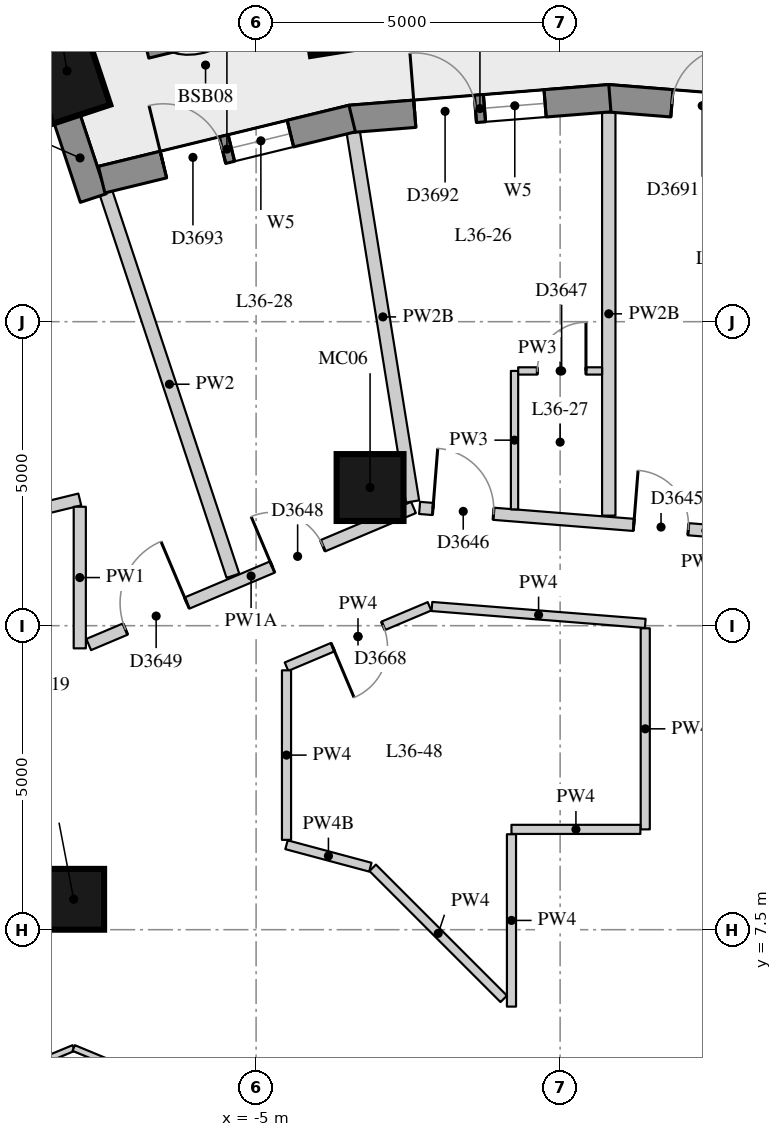
"""IFC4 building model, lengths in metres.
Left out: names, types, materials, properties, quantities, classifications, styles, units other than length and angle.
Written with IfcOpenShell. Run it as: python <this file> out.ifc"""

import sys

from ifc_helpers import new_model, si_unit, direction, frame, frame_2d, origin, origin_2d, place, context, subcontext, project, spatial, rectangle, extrude, element, fill, save


model = new_model("IFC4")
c1 = context("Model", 3, precision=1e-05, world=origin(), true_north=direction((0.0, 1.0)))
c2 = subcontext(c1, "Body", "Model", "MODEL_VIEW")
j1 = project(units=[si_unit("LENGTHUNIT", "METRE"), si_unit("PLANEANGLEUNIT", "RADIAN")], contexts=[c1])
p1 = place(None, origin())
s1 = spatial("IfcSite", under=j1, at=p1, CompositionType="ELEMENT")
p2 = place(p1, origin())
s2 = spatial("IfcBuilding", under=s1, at=p2, CompositionType="ELEMENT")
p3 = place(p2, frame((0.0, 0.0, 128.5)))
s3 = spatial("IfcBuildingStorey", under=s2, at=p3, CompositionType="ELEMENT", Elevation=128.5)
for number, where, z_axis, x_axis in (
    (1, (-3.724, 22.691, 0.0), (0.0, 0.0, 1.0), (-0.159, 0.987, 0.0)),
    (2, (-8.11, 21.624, 0.0), (0.0, 0.0, 1.0), (-0.315, 0.949, 0.0)),
):
    element("IfcColumn", number, at=place(p3, frame(where, z_axis=z_axis, x_axis=x_axis)), inside=s3, PredefinedType="COLUMN", context=c2, shape_type="SweptSolid", body=[
        extrude(rectangle(XDim=1.5, YDim=1.0, at=origin_2d()), origin(), (0.0, 0.0, 1.0), 3.3),
    ])
p4 = place(p3, frame((-8.0, 8.0, 0.0), z_axis=(0.0, 0.0, 1.0), x_axis=(1.0, 0.0, 0.0)))
e3 = element("IfcColumn", 3, at=p4, inside=s3, PredefinedType="COLUMN", context=c2, shape_type="SweptSolid", body=[
    extrude(rectangle(XDim=1.0, YDim=1.0, at=origin_2d()), origin(), (0.0, 0.0, 1.0), 3.3),
])
p5 = place(p3, frame((-3.126, 14.772, 0.0), z_axis=(0.0, 0.0, 1.0), x_axis=(1.0, 0.0, 0.0)))
e4 = element("IfcColumn", 4, at=p5, inside=s3, PredefinedType="COLUMN", context=c2, shape_type="SweptSolid", body=[
    extrude(rectangle(XDim=1.1, YDim=1.1, at=origin_2d()), origin(), (0.0, 0.0, 1.0), 3.3),
])
p6 = place(p3, frame((-8.114, 20.853, 0.0), z_axis=(0.0, 0.0, 1.0), x_axis=(0.314488854508, -0.949261165534, 0.0)))
e5 = element("IfcWall", 5, at=p6, inside=s3, PredefinedType="SOLIDWALL", context=c2, shape_type="SweptSolid", body=[
    extrude(rectangle(XDim=1.39, YDim=0.45, at=frame_2d((0.695, 0.0))), origin(), (0.0, 0.0, 1.0), 3.02),
])
p7 = place(p3, frame((5.038, 20.837, 0.0), z_axis=(0.0, 0.0, 1.0), x_axis=(-0.996839780714, 0.079438350855, 0.0)))
e6 = element("IfcWall", 6, at=p7, inside=s3, PredefinedType="SOLIDWALL", context=c2, shape_type="SweptSolid", body=[
    extrude(rectangle(XDim=4.269, YDim=0.45, at=frame_2d((2.134, 0.0))), origin(), (0.0, 0.0, 1.0), 3.02),
])
p8 = place(p7, frame((1.06, 0.0, 0.4)))
e7 = element("IfcOpeningElement", 7, at=p8, cuts=e6, PredefinedType="OPENING", context=c2, shape_type="SweptSolid", body=[
    extrude(rectangle(XDim=1.0, YDim=1.75, at=frame_2d((0.5, 0.875))), frame((0.0, 0.235, 0.0), z_axis=(0.0, -1.0, 0.0), x_axis=(1.0, 0.0, 0.0)), (0.0, 0.0, 1.0), 0.47),
])
p9 = place(p7, frame((2.209, 0.0, 0.0)))
e8 = element("IfcOpeningElement", 8, at=p9, cuts=e6, PredefinedType="OPENING", context=c2, shape_type="SweptSolid", body=[
    extrude(rectangle(XDim=1.0, YDim=2.15, at=frame_2d((0.5, 1.075))), frame((0.0, 0.235, 0.0), z_axis=(0.0, -1.0, 0.0), x_axis=(1.0, 0.0, 0.0)), (0.0, 0.0, 1.0), 0.47),
])
p10 = place(p3, frame((0.818, 21.176, 0.0), z_axis=(0.0, 0.0, 1.0), x_axis=(-0.996843824935, -0.079387585235, 0.0)))
e9 = element("IfcWall", 9, at=p10, inside=s3, PredefinedType="SOLIDWALL", context=c2, shape_type="SweptSolid", body=[
    extrude(rectangle(XDim=4.287, YDim=0.45, at=frame_2d((2.144, 0.0))), origin(), (0.0, 0.0, 1.0), 3.02),
])
p11 = place(p10, frame((1.068, 0.0, 0.4)))
e10 = element("IfcOpeningElement", 10, at=p11, cuts=e9, PredefinedType="OPENING", context=c2, shape_type="SweptSolid", body=[
    extrude(rectangle(XDim=1.0, YDim=1.75, at=frame_2d((0.5, 0.875))), frame((0.0, 0.235, 0.0), z_axis=(0.0, -1.0, 0.0), x_axis=(1.0, 0.0, 0.0)), (0.0, 0.0, 1.0), 0.47),
])
p12 = place(p10, frame((2.219, 0.0, 0.0)))
e11 = element("IfcOpeningElement", 11, at=p12, cuts=e9, PredefinedType="OPENING", context=c2, shape_type="SweptSolid", body=[
    extrude(rectangle(XDim=1.0, YDim=2.15, at=frame_2d((0.5, 1.075))), frame((0.0, 0.235, 0.0), z_axis=(0.0, -1.0, 0.0), x_axis=(1.0, 0.0, 0.0)), (0.0, 0.0, 1.0), 0.47),
])
p13 = place(p3, frame((-3.42, 20.841, 0.0), z_axis=(0.0, 0.0, 1.0), x_axis=(-0.971511611373, -0.23699195971, 0.0)))
e12 = element("IfcWall", 12, at=p13, inside=s3, PredefinedType="SOLIDWALL", context=c2, shape_type="SweptSolid", body=[
    extrude(rectangle(XDim=4.241, YDim=0.45, at=frame_2d((2.121, 0.0))), origin(), (0.0, 0.0, 1.0), 3.02),
])
p14 = place(p13, frame((1.045, 0.0, 0.4)))
e13 = element("IfcOpeningElement", 13, at=p14, cuts=e12, PredefinedType="OPENING", context=c2, shape_type="SweptSolid", body=[
    extrude(rectangle(XDim=1.0, YDim=1.75, at=frame_2d((0.5, 0.875))), frame((0.0, 0.235, 0.0), z_axis=(0.0, -1.0, 0.0), x_axis=(1.0, 0.0, 0.0)), (0.0, 0.0, 1.0), 0.47),
])
p15 = place(p13, frame((2.196, 0.0, 0.0)))
e14 = element("IfcOpeningElement", 14, at=p15, cuts=e12, PredefinedType="OPENING", context=c2, shape_type="SweptSolid", body=[
    extrude(rectangle(XDim=1.0, YDim=2.15, at=frame_2d((0.5, 1.075))), frame((0.0, 0.235, 0.0), z_axis=(0.0, -1.0, 0.0), x_axis=(1.0, 0.0, 0.0)), (0.0, 0.0, 1.0), 0.47),
])
p16 = place(p3, frame((-5.099, 22.601, 0.0), z_axis=(0.0, 0.0, 1.0), x_axis=(-0.971654974133, -0.23640349245, 0.0)))
e15 = element("IfcWall", 15, at=p16, inside=s3, PredefinedType="USERDEFINED", context=c2, shape_type="SweptSolid", body=[
    extrude(rectangle(XDim=1.8, YDim=0.7, at=frame_2d((0.9, 0.0))), origin(), (0.0, 0.0, 1.0), 0.75),
])
p17 = place(p3, frame((-9.884, 14.092, 0.0), z_axis=(0.0, 0.0, 1.0), x_axis=(0.971512281799, 0.236989211388, 0.0)))
e16 = element("IfcWall", 16, at=p17, inside=s3, PredefinedType="PARTITIONING", context=c2, shape_type="SweptSolid", body=[
    extrude(rectangle(XDim=2.042, YDim=0.2, at=frame_2d((1.021, 0.0))), origin(), (0.0, 0.0, 1.0), 3.02),
])
p18 = place(p3, frame((-7.9, 14.456, 0.0), z_axis=(0.0, 0.0, 1.0), x_axis=(0.0, -1.0, 0.0)))
e17 = element("IfcWall", 17, at=p18, inside=s3, PredefinedType="PARTITIONING", context=c2, shape_type="SweptSolid", body=[
    extrude(rectangle(XDim=2.328, YDim=0.2, at=frame_2d((1.164, 0.0))), origin(), (0.0, 0.0, 1.0), 3.02),
])
p19 = place(p3, frame((-7.753, 12.19, 0.0), z_axis=(0.0, 0.0, 1.0), x_axis=(0.921319622993, 0.388806059994, 0.0)))
e18 = element("IfcWall", 18, at=p19, inside=s3, PredefinedType="PARTITIONING", context=c2, shape_type="SweptSolid", body=[
    extrude(rectangle(XDim=5.798, YDim=0.2, at=frame_2d((2.899, 0.0))), origin(), (0.0, 0.0, 1.0), 2.57),
])
p20 = place(p19, frame((3.28, 0.0, 0.0)))
e19 = element("IfcOpeningElement", 19, at=p20, cuts=e18, PredefinedType="OPENING", context=c2, shape_type="SweptSolid", body=[
    extrude(rectangle(XDim=0.9, YDim=2.1, at=frame_2d((0.45, 1.05))), frame((0.0, 0.11, 0.0), z_axis=(0.0, -1.0, 0.0), x_axis=(1.0, 0.0, 0.0)), (0.0, 0.0, 1.0), 0.22),
])
p21 = place(p19, frame((0.654, 0.0, 0.0)))
e20 = element("IfcOpeningElement", 20, at=p21, cuts=e18, PredefinedType="OPENING", context=c2, shape_type="SweptSolid", body=[
    extrude(rectangle(XDim=1.1, YDim=2.1, at=frame_2d((0.55, 1.05))), frame((0.0, 0.11, 0.0), z_axis=(0.0, -1.0, 0.0), x_axis=(1.0, 0.0, 0.0)), (0.0, 0.0, 1.0), 0.22),
])
p22 = place(p3, frame((-2.311, 14.437, 0.0), z_axis=(0.0, 0.0, 1.0), x_axis=(0.996870762165, -0.079048615048, 0.0)))
e21 = element("IfcWall", 21, at=p22, inside=s3, PredefinedType="PARTITIONING", context=c2, shape_type="SweptSolid", body=[
    extrude(rectangle(XDim=9.445, YDim=0.2, at=frame_2d((4.722, 0.0))), origin(), (0.0, 0.0, 1.0), 2.42),
])
p23 = place(p22, frame((6.471, 0.0, 0.0)))
e22 = element("IfcOpeningElement", 22, at=p23, cuts=e21, PredefinedType="OPENING", context=c2, shape_type="SweptSolid", body=[
    extrude(rectangle(XDim=1.0, YDim=2.1, at=frame_2d((0.5, 1.05))), frame((0.0, 0.11, 0.0), z_axis=(0.0, -1.0, 0.0), x_axis=(1.0, 0.0, 0.0)), (0.0, 0.0, 1.0), 0.22),
])
p24 = place(p22, frame((3.533, 0.0, 0.0)))
e23 = element("IfcOpeningElement", 23, at=p24, cuts=e21, PredefinedType="OPENING", context=c2, shape_type="SweptSolid", body=[
    extrude(rectangle(XDim=0.9, YDim=2.1, at=frame_2d((0.45, 1.05))), frame((0.0, 0.11, 0.0), z_axis=(0.0, -1.0, 0.0), x_axis=(1.0, 0.0, 0.0)), (0.0, 0.0, 1.0), 0.22),
])
p25 = place(p22, frame((0.22, 0.0, 0.0)))
e24 = element("IfcOpeningElement", 24, at=p25, cuts=e21, PredefinedType="OPENING", context=c2, shape_type="SweptSolid", body=[
    extrude(rectangle(XDim=1.0, YDim=2.1, at=frame_2d((0.5, 1.05))), frame((0.0, 0.11, 0.0), z_axis=(0.0, -1.0, 0.0), x_axis=(1.0, 0.0, 0.0)), (0.0, 0.0, 1.0), 0.22),
])
p26 = place(p3, frame((-4.5, 11.826, 0.0), z_axis=(0.0, 0.0, 1.0), x_axis=(0.921264033472, 0.388937759329, 0.0)))
e25 = element("IfcWall", 25, at=p26, inside=s3, PredefinedType="PARTITIONING", context=c2, shape_type="SweptSolid", body=[
    extrude(rectangle(XDim=2.552, YDim=0.15, at=frame_2d((1.276, 0.0))), origin(), (0.0, 0.0, 1.0), 3.02),
])
p27 = place(p26, frame((0.826, 0.0, 0.0)))
e26 = element("IfcOpeningElement", 26, at=p27, cuts=e25, PredefinedType="OPENING", context=c2, shape_type="SweptSolid", body=[
    extrude(rectangle(XDim=0.9, YDim=2.1, at=frame_2d((0.45, 1.05))), frame((0.0, 0.085, 0.0), z_axis=(0.0, -1.0, 0.0), x_axis=(1.0, 0.0, 0.0)), (0.0, 0.0, 1.0), 0.17),
])
p28 = place(p3, frame((-2.109, 12.816, 0.0), z_axis=(0.0, 0.0, 1.0), x_axis=(0.996868431192, -0.079078005119, 0.0)))
e27 = element("IfcWall", 27, at=p28, inside=s3, PredefinedType="PARTITIONING", context=c2, shape_type="SweptSolid", body=[
    extrude(rectangle(XDim=3.52, YDim=0.15, at=frame_2d((1.76, 0.0))), origin(), (0.0, 0.0, 1.0), 3.02),
])
p29 = place(p3, frame((1.4, 12.457, 0.0), z_axis=(0.0, 0.0, 1.0), x_axis=(0.0, -1.0, 0.0)))
e28 = element("IfcWall", 28, at=p29, inside=s3, PredefinedType="PARTITIONING", context=c2, shape_type="SweptSolid", body=[
    extrude(rectangle(XDim=3.307, YDim=0.15, at=frame_2d((1.654, 0.0))), origin(), (0.0, 0.0, 1.0), 3.02),
])
p30 = place(p3, frame((1.32, 9.15, 0.0), z_axis=(0.0, 0.0, 1.0), x_axis=(-1.0, 0.0, 0.0)))
e29 = element("IfcWall", 29, at=p30, inside=s3, PredefinedType="PARTITIONING", context=c2, shape_type="SweptSolid", body=[
    extrude(rectangle(XDim=2.12, YDim=0.15, at=frame_2d((1.06, 0.0))), origin(), (0.0, 0.0, 1.0), 3.02),
])
p31 = place(p3, frame((-0.8, 9.07, 0.0), z_axis=(0.0, 0.0, 1.0), x_axis=(0.0, -1.0, 0.0)))
e30 = element("IfcWall", 30, at=p31, inside=s3, PredefinedType="PARTITIONING", context=c2, shape_type="SweptSolid", body=[
    extrude(rectangle(XDim=2.835, YDim=0.15, at=frame_2d((1.417, 0.0))), origin(), (0.0, 0.0, 1.0), 3.02),
])
p32 = place(p3, frame((-0.927, 6.363, 0.0), z_axis=(0.0, 0.0, 1.0), x_axis=(-0.707106781187, 0.707106781187, 0.0)))
e31 = element("IfcWall", 31, at=p32, inside=s3, PredefinedType="PARTITIONING", context=c2, shape_type="SweptSolid", body=[
    extrude(rectangle(XDim=3.048, YDim=0.15, at=frame_2d((1.524, 0.0))), origin(), (0.0, 0.0, 1.0), 3.02),
])
p33 = place(p3, frame((-3.121, 8.528, 0.0), z_axis=(0.0, 0.0, 1.0), x_axis=(-0.965941945062, 0.258758881529, 0.0)))
e32 = element("IfcWall", 32, at=p33, inside=s3, PredefinedType="PARTITIONING", context=c2, shape_type="SweptSolid", body=[
    extrude(rectangle(XDim=1.427, YDim=0.15, at=frame_2d((0.714, 0.0))), origin(), (0.0, 0.0, 1.0), 2.47),
])
p34 = place(p3, frame((-4.5, 8.977, 0.0), z_axis=(0.0, 0.0, 1.0), x_axis=(0.0, 1.0, 0.0)))
e33 = element("IfcWall", 33, at=p34, inside=s3, PredefinedType="PARTITIONING", context=c2, shape_type="SweptSolid", body=[
    extrude(rectangle(XDim=2.789, YDim=0.15, at=frame_2d((1.394, 0.0))), origin(), (0.0, 0.0, 1.0), 3.02),
])
p35 = place(p3, frame((0.8, 20.948, 0.0), z_axis=(0.0, 0.0, 1.0), x_axis=(0.0, -1.0, 0.0)))
e34 = element("IfcWall", 34, at=p35, inside=s3, PredefinedType="PARTITIONING", context=c2, shape_type="SweptSolid", body=[
    extrude(rectangle(XDim=6.638, YDim=0.22, at=frame_2d((3.319, 0.0))), origin(), (0.0, 0.0, 1.0), 2.57),
])
p36 = place(p3, frame((-3.402, 20.614, 0.0), z_axis=(0.0, 0.0, 1.0), x_axis=(0.158510822082, -0.987357239951, 0.0)))
e35 = element("IfcWall", 35, at=p36, inside=s3, PredefinedType="PARTITIONING", context=c2, shape_type="SweptSolid", body=[
    extrude(rectangle(XDim=6.148, YDim=0.22, at=frame_2d((3.074, 0.0))), origin(), (0.0, 0.0, 1.0), 2.57),
])
p37 = place(p3, frame((-7.469, 19.622, 0.0), z_axis=(0.0, 0.0, 1.0), x_axis=(0.314539081996, -0.949244523765, 0.0)))
e36 = element("IfcWall", 36, at=p37, inside=s3, PredefinedType="PARTITIONING", context=c2, shape_type="SweptSolid", body=[
    extrude(rectangle(XDim=6.638, YDim=0.22, at=frame_2d((3.319, 0.0))), origin(), (0.0, 0.0, 1.0), 3.02),
])
p38 = place(p3, frame((-0.75, 14.413, 0.0), z_axis=(0.0, 0.0, 1.0), x_axis=(0.0, 1.0, 0.0)))
e37 = element("IfcWall", 37, at=p38, inside=s3, PredefinedType="PARTITIONING", context=c2, shape_type="SweptSolid", body=[
    extrude(rectangle(XDim=2.277, YDim=0.12, at=frame_2d((1.138, 0.0))), origin(), (0.0, 0.0, 1.0), 3.02),
])
p39 = place(p3, frame((-0.69, 16.69, 0.0), z_axis=(0.0, 0.0, 1.0), x_axis=(1.0, 0.0, 0.0)))
e38 = element("IfcWall", 38, at=p39, inside=s3, PredefinedType="PARTITIONING", context=c2, shape_type="SweptSolid", body=[
    extrude(rectangle(XDim=1.38, YDim=0.12, at=frame_2d((0.69, 0.0))), origin(), (0.0, 0.0, 1.0), 3.02),
])
p40 = place(p39, frame((0.315, 0.0, 0.0)))
e39 = element("IfcOpeningElement", 39, at=p40, cuts=e38, PredefinedType="OPENING", context=c2, shape_type="SweptSolid", body=[
    extrude(rectangle(XDim=0.8, YDim=2.1, at=frame_2d((0.4, 1.05))), frame((0.0, 0.07, 0.0), z_axis=(0.0, -1.0, 0.0), x_axis=(1.0, 0.0, 0.0)), (0.0, 0.0, 1.0), 0.14),
])
for number, where, z_axis, x_axis in (
    (40, (-11.927, 3.927, 0.0), (0.0, 0.0, 1.0), (0.924, 0.383, 0.0)),
    (41, (-8.0, 5.554, 0.0), (0.0, 0.0, 1.0), (0.924, -0.383, 0.0)),
):
    element("IfcWall", number, at=place(p3, frame(where, z_axis=z_axis, x_axis=x_axis)), inside=s3, PredefinedType="PARTITIONING", context=c2, shape_type="SweptSolid", body=[
        extrude(rectangle(XDim=4.251, YDim=0.1, at=frame_2d((2.125, 0.0))), origin(), (0.0, 0.0, 1.0), 3.02),
    ])
p41 = place(p9, frame((1.0, 0.0, 0.0), z_axis=(0.0, 0.0, 1.0), x_axis=(-1.0, 0.0, 0.0)))
e42 = element("IfcDoor", 42, at=p41, inside=s3, OperationType="SINGLE_SWING_RIGHT", PredefinedType="DOOR", context=c2, shape_type="SweptSolid", body=[
    extrude(rectangle(XDim=1.0, YDim=2.15, at=frame_2d((0.5, 1.075))), frame((0.0, 0.075, 0.0), z_axis=(0.0, -1.0, 0.0), x_axis=(1.0, 0.0, 0.0)), (0.0, 0.0, 1.0), 0.05),
])
fill(e8, e42)
p42 = place(p11, origin())
e43 = element("IfcWindow", 43, at=p42, inside=s3, PartitioningType="SINGLE_PANEL", PredefinedType="WINDOW", context=c2, shape_type="SweptSolid", body=[
    extrude(rectangle(XDim=1.0, YDim=1.75, at=frame_2d((0.5, 0.875))), frame((0.0, 0.035, 0.0), z_axis=(0.0, -1.0, 0.0), x_axis=(1.0, 0.0, 0.0)), (0.0, 0.0, 1.0), 0.06),
])
fill(e10, e43)
p43 = place(p12, frame((1.0, 0.0, 0.0), z_axis=(0.0, 0.0, 1.0), x_axis=(-1.0, 0.0, 0.0)))
e44 = element("IfcDoor", 44, at=p43, inside=s3, OperationType="SINGLE_SWING_LEFT", PredefinedType="DOOR", context=c2, shape_type="SweptSolid", body=[
    extrude(rectangle(XDim=1.0, YDim=2.15, at=frame_2d((0.5, 1.075))), frame((0.0, 0.075, 0.0), z_axis=(0.0, -1.0, 0.0), x_axis=(1.0, 0.0, 0.0)), (0.0, 0.0, 1.0), 0.05),
])
fill(e11, e44)
p44 = place(p14, origin())
e45 = element("IfcWindow", 45, at=p44, inside=s3, PartitioningType="SINGLE_PANEL", PredefinedType="WINDOW", context=c2, shape_type="SweptSolid", body=[
    extrude(rectangle(XDim=1.0, YDim=1.75, at=frame_2d((0.5, 0.875))), frame((0.0, 0.035, 0.0), z_axis=(0.0, -1.0, 0.0), x_axis=(1.0, 0.0, 0.0)), (0.0, 0.0, 1.0), 0.06),
])
fill(e13, e45)
p45 = place(p15, frame((1.0, 0.0, 0.0), z_axis=(0.0, 0.0, 1.0), x_axis=(-1.0, 0.0, 0.0)))
e46 = element("IfcDoor", 46, at=p45, inside=s3, OperationType="SINGLE_SWING_LEFT", PredefinedType="DOOR", context=c2, shape_type="SweptSolid", body=[
    extrude(rectangle(XDim=1.0, YDim=2.15, at=frame_2d((0.5, 1.075))), frame((0.0, 0.075, 0.0), z_axis=(0.0, -1.0, 0.0), x_axis=(1.0, 0.0, 0.0)), (0.0, 0.0, 1.0), 0.05),
])
fill(e14, e46)
p46 = place(p24, origin())
e47 = element("IfcDoor", 47, at=p46, inside=s3, OperationType="SINGLE_SWING_LEFT", PredefinedType="DOOR", context=c2, shape_type="SweptSolid", body=[
    extrude(rectangle(XDim=0.9, YDim=2.1, at=frame_2d((0.45, 1.05))), frame((0.0, 0.025, 0.0), z_axis=(0.0, -1.0, 0.0), x_axis=(1.0, 0.0, 0.0)), (0.0, 0.0, 1.0), 0.05),
])
fill(e23, e47)
p47 = place(p25, origin())
e48 = element("IfcDoor", 48, at=p47, inside=s3, OperationType="SINGLE_SWING_LEFT", PredefinedType="DOOR", context=c2, shape_type="SweptSolid", body=[
    extrude(rectangle(XDim=1.0, YDim=2.1, at=frame_2d((0.5, 1.05))), frame((0.0, 0.025, 0.0), z_axis=(0.0, -1.0, 0.0), x_axis=(1.0, 0.0, 0.0)), (0.0, 0.0, 1.0), 0.05),
])
fill(e24, e48)
p48 = place(p40, origin())
e49 = element("IfcDoor", 49, at=p48, inside=s3, OperationType="SINGLE_SWING_RIGHT", PredefinedType="DOOR", context=c2, shape_type="SweptSolid", body=[
    extrude(rectangle(XDim=0.8, YDim=2.1, at=frame_2d((0.4, 1.05))), frame((0.0, 0.025, 0.0), z_axis=(0.0, -1.0, 0.0), x_axis=(1.0, 0.0, 0.0)), (0.0, 0.0, 1.0), 0.05),
])
fill(e39, e49)
p49 = place(p20, origin())
e50 = element("IfcDoor", 50, at=p49, inside=s3, OperationType="SINGLE_SWING_LEFT", PredefinedType="DOOR", context=c2, shape_type="SweptSolid", body=[
    extrude(rectangle(XDim=0.9, YDim=2.1, at=frame_2d((0.45, 1.05))), frame((0.0, 0.025, 0.0), z_axis=(0.0, -1.0, 0.0), x_axis=(1.0, 0.0, 0.0)), (0.0, 0.0, 1.0), 0.05),
])
fill(e19, e50)
p50 = place(p21, origin())
e51 = element("IfcDoor", 51, at=p50, inside=s3, OperationType="SINGLE_SWING_RIGHT", PredefinedType="DOOR", context=c2, shape_type="SweptSolid", body=[
    extrude(rectangle(XDim=1.1, YDim=2.1, at=frame_2d((0.55, 1.05))), frame((0.0, 0.025, 0.0), z_axis=(0.0, -1.0, 0.0), x_axis=(1.0, 0.0, 0.0)), (0.0, 0.0, 1.0), 0.05),
])
fill(e20, e51)
p51 = place(p27, origin())
e52 = element("IfcDoor", 52, at=p51, inside=s3, OperationType="SINGLE_SWING_RIGHT", PredefinedType="DOOR", context=c2, shape_type="SweptSolid", body=[
    extrude(rectangle(XDim=0.9, YDim=2.1, at=frame_2d((0.45, 1.05))), frame((0.0, 0.025, 0.0), z_axis=(0.0, -1.0, 0.0), x_axis=(1.0, 0.0, 0.0)), (0.0, 0.0, 1.0), 0.05),
])
fill(e26, e52)
save(model, sys.argv[1])
